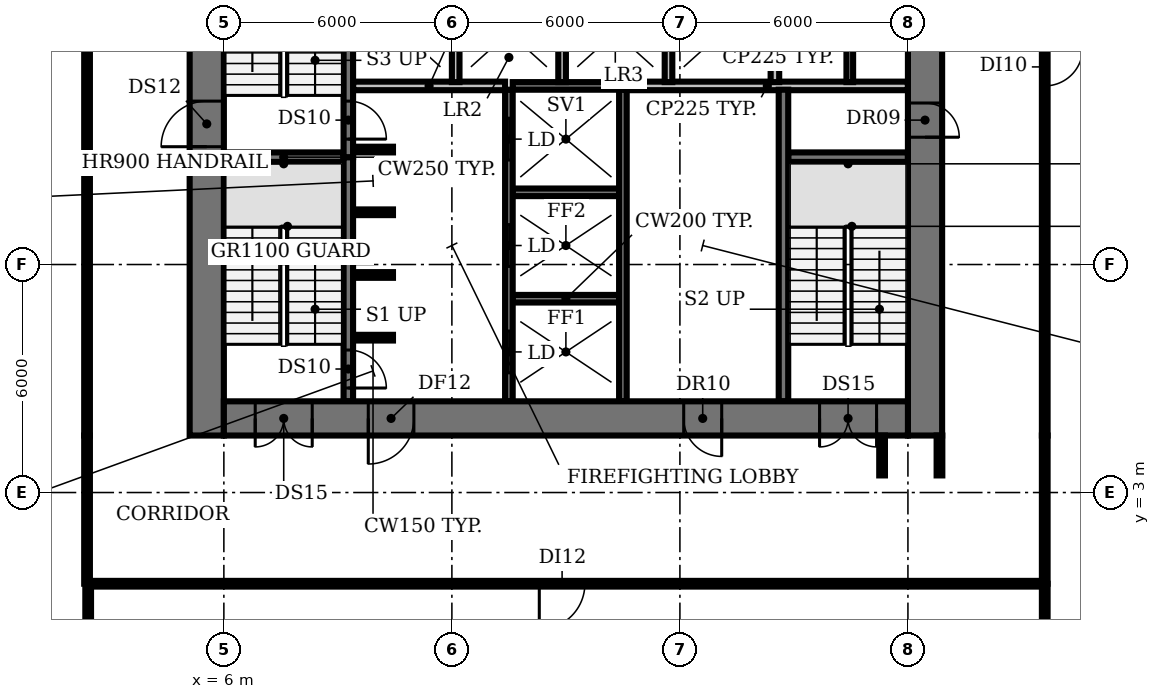
"""IFC4 building model, lengths in metres.
Left out: names, types, materials, properties, quantities, classifications, styles, units other than length and angle.
Written with IfcOpenShell. Run it as: python <this file> out.ifc"""

import sys

from ifc_helpers import new_model, si_unit, direction, frame, frame_2d, origin, place, context, subcontext, project, spatial, rectangle, extrude, element, fill, save


model = new_model("IFC4")
c1 = context("Model", 3, precision=1e-05, world=origin(), true_north=direction((0.0, 1.0)))
c2 = subcontext(c1, "Body", "Model", "MODEL_VIEW")
j1 = project(units=[si_unit("LENGTHUNIT", "METRE"), si_unit("PLANEANGLEUNIT", "RADIAN")], contexts=[c1])
p1 = place(None, origin())
s1 = spatial("IfcSite", under=j1, at=p1, CompositionType="ELEMENT")
p2 = place(p1, origin())
s2 = spatial("IfcBuilding", under=s1, at=p2, CompositionType="ELEMENT")
p3 = place(p2, frame((0.0, 0.0, 15.5)))
s3 = spatial("IfcBuildingStorey", under=s2, at=p3, CompositionType="ELEMENT", Elevation=15.5)
p4 = place(p3, frame((9.4, 7.075, 0.0), z_axis=(0.0, 0.0, 1.0), x_axis=(1.0, 0.0, 0.0)))
e1 = element("IfcWall", 1, at=p4, inside=s3, PredefinedType="SHEAR", context=c2, shape_type="SweptSolid", body=[
    extrude(rectangle(XDim=1.05, YDim=0.15, at=frame_2d((0.525, 0.0))), origin(), (0.0, 0.0, 1.0), 4.15),
])
p5 = place(p3, frame((13.6, 8.1, 0.0), z_axis=(0.0, 0.0, 1.0), x_axis=(1.0, 0.0, 0.0)))
e2 = element("IfcWall", 2, at=p5, inside=s3, PredefinedType="SHEAR", context=c2, shape_type="SweptSolid", body=[
    extrude(rectangle(XDim=2.8, YDim=0.2, at=frame_2d((1.4, 0.0))), origin(), (0.0, 0.0, 1.0), 4.15),
])
for number, where, z_axis, x_axis in (
    (3, (9.4, 8.725, 0.0), (0.0, 0.0, 1.0), (1.0, 0.0, 0.0)),
    (4, (9.4, 10.375, 0.0), (0.0, 0.0, 1.0), (1.0, 0.0, 0.0)),
):
    element("IfcWall", number, at=place(p3, frame(where, z_axis=z_axis, x_axis=x_axis)), inside=s3, PredefinedType="SHEAR", context=c2, shape_type="SweptSolid", body=[
        extrude(rectangle(XDim=1.05, YDim=0.15, at=frame_2d((0.525, 0.0))), origin(), (0.0, 0.0, 1.0), 4.15),
    ])
p6 = place(p3, frame((13.6, 10.9, 0.0), z_axis=(0.0, 0.0, 1.0), x_axis=(1.0, 0.0, 0.0)))
e5 = element("IfcWall", 5, at=p6, inside=s3, PredefinedType="SHEAR", context=c2, shape_type="SweptSolid", body=[
    extrude(rectangle(XDim=2.8, YDim=0.2, at=frame_2d((1.4, 0.0))), origin(), (0.0, 0.0, 1.0), 4.15),
])
for number, where, z_axis, x_axis in (
    (6, (6.0, 11.825, 0.0), (0.0, 0.0, 1.0), (1.0, 0.0, 0.0)),
    (7, (20.85, 11.825, 0.0), (0.0, 0.0, 1.0), (1.0, 0.0, 0.0)),
):
    element("IfcWall", number, at=place(p3, frame(where, z_axis=z_axis, x_axis=x_axis)), inside=s3, PredefinedType="SHEAR", context=c2, shape_type="SweptSolid", body=[
        extrude(rectangle(XDim=3.15, YDim=0.25, at=frame_2d((1.575, 0.0))), origin(), (0.0, 0.0, 1.0), 4.15),
    ])
p7 = place(p3, frame((9.4, 12.025, 0.0), z_axis=(0.0, 0.0, 1.0), x_axis=(1.0, 0.0, 0.0)))
e8 = element("IfcWall", 8, at=p7, inside=s3, PredefinedType="SHEAR", context=c2, shape_type="SweptSolid", body=[
    extrude(rectangle(XDim=1.05, YDim=0.15, at=frame_2d((0.525, 0.0))), origin(), (0.0, 0.0, 1.0), 4.15),
])
p8 = place(p3, frame((9.4, 13.7, 0.0), z_axis=(0.0, 0.0, 1.0), x_axis=(1.0, 0.0, 0.0)))
e9 = element("IfcWall", 9, at=p8, inside=s3, PredefinedType="PARTITIONING", context=c2, shape_type="SweptSolid", body=[
    extrude(rectangle(XDim=4.0, YDim=0.225, at=frame_2d((2.0, 0.0))), origin(), (0.0, 0.0, 1.0), 4.15),
])
p9 = place(p3, frame((13.6, 13.7, 0.0), z_axis=(0.0, 0.0, 1.0), x_axis=(1.0, 0.0, 0.0)))
e10 = element("IfcWall", 10, at=p9, inside=s3, PredefinedType="SHEAR", context=c2, shape_type="SweptSolid", body=[
    extrude(rectangle(XDim=2.8, YDim=0.2, at=frame_2d((1.4, 0.0))), origin(), (0.0, 0.0, 1.0), 4.15),
])
p10 = place(p3, frame((16.6, 13.7, 0.0), z_axis=(0.0, 0.0, 1.0), x_axis=(1.0, 0.0, 0.0)))
e11 = element("IfcWall", 11, at=p10, inside=s3, PredefinedType="PARTITIONING", context=c2, shape_type="SweptSolid", body=[
    extrude(rectangle(XDim=7.4, YDim=0.225, at=frame_2d((3.7, 0.0))), origin(), (0.0, 0.0, 1.0), 4.15),
])
p11 = place(p3, frame((9.275, 11.825, 0.0), z_axis=(0.0, 0.0, 1.0), x_axis=(0.0, -1.0, 0.0)))
e12 = element("IfcWall", 12, at=p11, inside=s3, PredefinedType="SHEAR", context=c2, shape_type="SweptSolid", body=[
    extrude(rectangle(XDim=6.425, YDim=0.25, at=frame_2d((3.212, 0.0))), origin(), (0.0, 0.0, 1.0), 4.15),
])
p12 = place(p11, frame((5.075, 0.0, 0.0)))
e13 = element("IfcOpeningElement", 13, at=p12, cuts=e12, PredefinedType="OPENING", context=c2, shape_type="SweptSolid", body=[
    extrude(rectangle(XDim=1.0, YDim=2.1, at=frame_2d((0.5, 1.05))), frame((0.0, 0.135, 0.0), z_axis=(0.0, -1.0, 0.0), x_axis=(1.0, 0.0, 0.0)), (0.0, 0.0, 1.0), 0.27),
])
p13 = place(p3, frame((9.275, 18.375, 0.0), z_axis=(0.0, 0.0, 1.0), x_axis=(0.0, -1.0, 0.0)))
e14 = element("IfcWall", 14, at=p13, inside=s3, PredefinedType="SHEAR", context=c2, shape_type="SweptSolid", body=[
    extrude(rectangle(XDim=6.55, YDim=0.25, at=frame_2d((3.275, 0.0))), origin(), (0.0, 0.0, 1.0), 4.15),
])
p14 = place(p13, frame((5.075, 0.0, 0.0)))
e15 = element("IfcOpeningElement", 15, at=p14, cuts=e14, PredefinedType="OPENING", context=c2, shape_type="SweptSolid", body=[
    extrude(rectangle(XDim=1.0, YDim=2.1, at=frame_2d((0.5, 1.05))), frame((0.0, 0.135, 0.0), z_axis=(0.0, -1.0, 0.0), x_axis=(1.0, 0.0, 0.0)), (0.0, 0.0, 1.0), 0.27),
])
p15 = place(p3, frame((12.1, 13.8, 0.0), z_axis=(0.0, 0.0, 1.0), x_axis=(0.0, 1.0, 0.0)))
e16 = element("IfcWall", 16, at=p15, inside=s3, PredefinedType="SOLIDWALL", context=c2, shape_type="SweptSolid", body=[
    extrude(rectangle(XDim=2.6, YDim=0.2, at=frame_2d((1.3, 0.0))), origin(), (0.0, 0.0, 1.0), 4.15),
])
p16 = place(p3, frame((13.5, 5.4, 0.0), z_axis=(0.0, 0.0, 1.0), x_axis=(0.0, 1.0, 0.0)))
e17 = element("IfcWall", 17, at=p16, inside=s3, PredefinedType="SHEAR", context=c2, shape_type="SweptSolid", body=[
    extrude(rectangle(XDim=8.2, YDim=0.2, at=frame_2d((4.1, 0.0))), origin(), (0.0, 0.0, 1.0), 4.15),
])
p17 = place(p16, frame((0.75, 0.0, 0.0)))
e18 = element("IfcOpeningElement", 18, at=p17, cuts=e17, PredefinedType="OPENING", context=c2, shape_type="SweptSolid", body=[
    extrude(rectangle(XDim=1.1, YDim=2.1, at=frame_2d((0.55, 1.05))), frame((0.0, 0.11, 0.0), z_axis=(0.0, -1.0, 0.0), x_axis=(1.0, 0.0, 0.0)), (0.0, 0.0, 1.0), 0.22),
])
p18 = place(p16, frame((3.55, 0.0, 0.0)))
e19 = element("IfcOpeningElement", 19, at=p18, cuts=e17, PredefinedType="OPENING", context=c2, shape_type="SweptSolid", body=[
    extrude(rectangle(XDim=1.1, YDim=2.1, at=frame_2d((0.55, 1.05))), frame((0.0, 0.11, 0.0), z_axis=(0.0, -1.0, 0.0), x_axis=(1.0, 0.0, 0.0)), (0.0, 0.0, 1.0), 0.22),
])
p19 = place(p16, frame((6.35, 0.0, 0.0)))
e20 = element("IfcOpeningElement", 20, at=p19, cuts=e17, PredefinedType="OPENING", context=c2, shape_type="SweptSolid", body=[
    extrude(rectangle(XDim=1.1, YDim=2.1, at=frame_2d((0.55, 1.05))), frame((0.0, 0.11, 0.0), z_axis=(0.0, -1.0, 0.0), x_axis=(1.0, 0.0, 0.0)), (0.0, 0.0, 1.0), 0.22),
])
p20 = place(p3, frame((14.9, 13.8, 0.0), z_axis=(0.0, 0.0, 1.0), x_axis=(0.0, 1.0, 0.0)))
e21 = element("IfcWall", 21, at=p20, inside=s3, PredefinedType="SOLIDWALL", context=c2, shape_type="SweptSolid", body=[
    extrude(rectangle(XDim=2.6, YDim=0.2, at=frame_2d((1.3, 0.0))), origin(), (0.0, 0.0, 1.0), 4.15),
])
p21 = place(p3, frame((16.5, 5.4, 0.0), z_axis=(0.0, 0.0, 1.0), x_axis=(0.0, 1.0, 0.0)))
e22 = element("IfcWall", 22, at=p21, inside=s3, PredefinedType="SHEAR", context=c2, shape_type="SweptSolid", body=[
    extrude(rectangle(XDim=8.2, YDim=0.2, at=frame_2d((4.1, 0.0))), origin(), (0.0, 0.0, 1.0), 4.15),
])
p22 = place(p3, frame((17.7, 13.8, 0.0), z_axis=(0.0, 0.0, 1.0), x_axis=(0.0, 1.0, 0.0)))
e23 = element("IfcWall", 23, at=p22, inside=s3, PredefinedType="SOLIDWALL", context=c2, shape_type="SweptSolid", body=[
    extrude(rectangle(XDim=2.6, YDim=0.2, at=frame_2d((1.3, 0.0))), origin(), (0.0, 0.0, 1.0), 4.15),
])
p23 = place(p3, frame((20.5, 13.8, 0.0), z_axis=(0.0, 0.0, 1.0), x_axis=(0.0, 1.0, 0.0)))
e24 = element("IfcWall", 24, at=p23, inside=s3, PredefinedType="PARTITIONING", context=c2, shape_type="SweptSolid", body=[
    extrude(rectangle(XDim=2.6, YDim=0.225, at=frame_2d((1.3, 0.0))), origin(), (0.0, 0.0, 1.0), 4.15),
])
p24 = place(p3, frame((20.725, 5.4, 0.0), z_axis=(0.0, 0.0, 1.0), x_axis=(0.0, 1.0, 0.0)))
e25 = element("IfcWall", 25, at=p24, inside=s3, PredefinedType="SHEAR", context=c2, shape_type="SweptSolid", body=[
    extrude(rectangle(XDim=8.2, YDim=0.25, at=frame_2d((4.1, 0.0))), origin(), (0.0, 0.0, 1.0), 4.15),
])
p25 = place(p3, frame((22.47, 13.8, 0.0), z_axis=(0.0, 0.0, 1.0), x_axis=(0.0, 1.0, 0.0)))
e26 = element("IfcWall", 26, at=p25, inside=s3, PredefinedType="PARTITIONING", context=c2, shape_type="SweptSolid", body=[
    extrude(rectangle(XDim=2.6, YDim=0.175, at=frame_2d((1.3, 0.0))), origin(), (0.0, 0.0, 1.0), 4.15),
])
p26 = place(p3, frame((5.55, 4.5, 0.0), z_axis=(0.0, 0.0, 1.0), x_axis=(0.0, 1.0, 0.0)))
e27 = element("IfcWall", 27, at=p26, inside=s3, PredefinedType="SHEAR", context=c2, shape_type="SweptSolid", body=[
    extrude(rectangle(XDim=21.2, YDim=0.9, at=frame_2d((10.6, 0.0))), origin(), (0.0, 0.0, 1.0), 4.15),
])
p27 = place(p26, frame((7.6, 0.0, 0.0)))
e28 = element("IfcOpeningElement", 28, at=p27, cuts=e27, PredefinedType="OPENING", context=c2, shape_type="SweptSolid", body=[
    extrude(rectangle(XDim=1.2, YDim=2.1, at=frame_2d((0.6, 1.05))), frame((0.0, 0.46, 0.0), z_axis=(0.0, -1.0, 0.0), x_axis=(1.0, 0.0, 0.0)), (0.0, 0.0, 1.0), 0.92),
])
p28 = place(p26, frame((14.15, 0.0, 0.0)))
e29 = element("IfcOpeningElement", 29, at=p28, cuts=e27, PredefinedType="OPENING", context=c2, shape_type="SweptSolid", body=[
    extrude(rectangle(XDim=1.2, YDim=2.1, at=frame_2d((0.6, 1.05))), frame((0.0, 0.46, 0.0), z_axis=(0.0, -1.0, 0.0), x_axis=(1.0, 0.0, 0.0)), (0.0, 0.0, 1.0), 0.92),
])
p29 = place(p3, frame((24.45, 25.7, 0.0), z_axis=(0.0, 0.0, 1.0), x_axis=(0.0, -1.0, 0.0)))
e30 = element("IfcWall", 30, at=p29, inside=s3, PredefinedType="SHEAR", context=c2, shape_type="SweptSolid", body=[
    extrude(rectangle(XDim=21.2, YDim=0.9, at=frame_2d((10.6, 0.0))), origin(), (0.0, 0.0, 1.0), 4.15),
])
p30 = place(p29, frame((12.45, 0.0, 0.0)))
e31 = element("IfcOpeningElement", 31, at=p30, cuts=e30, PredefinedType="OPENING", context=c2, shape_type="SweptSolid", body=[
    extrude(rectangle(XDim=0.9, YDim=2.1, at=frame_2d((0.45, 1.05))), frame((0.0, 0.46, 0.0), z_axis=(0.0, -1.0, 0.0), x_axis=(1.0, 0.0, 0.0)), (0.0, 0.0, 1.0), 0.92),
])
p31 = place(p29, frame((6.45, 0.0, 0.0)))
e32 = element("IfcOpeningElement", 32, at=p31, cuts=e30, PredefinedType="OPENING", context=c2, shape_type="SweptSolid", body=[
    extrude(rectangle(XDim=2.0, YDim=2.1, at=frame_2d((1.0, 1.05))), frame((0.0, 0.46, 0.0), z_axis=(0.0, -1.0, 0.0), x_axis=(1.0, 0.0, 0.0)), (0.0, 0.0, 1.0), 0.92),
])
p32 = place(p3, frame((24.0, 4.95, 0.0), z_axis=(0.0, 0.0, 1.0), x_axis=(-1.0, 0.0, 0.0)))
e33 = element("IfcWall", 33, at=p32, inside=s3, PredefinedType="SHEAR", context=c2, shape_type="SweptSolid", body=[
    extrude(rectangle(XDim=18.0, YDim=0.9, at=frame_2d((9.0, 0.0))), origin(), (0.0, 0.0, 1.0), 4.15),
])
p33 = place(p32, frame((15.675, 0.0, 0.0)))
e34 = element("IfcOpeningElement", 34, at=p33, cuts=e33, PredefinedType="OPENING", context=c2, shape_type="SweptSolid", body=[
    extrude(rectangle(XDim=1.5, YDim=2.1, at=frame_2d((0.75, 1.05))), frame((0.0, 0.46, 0.0), z_axis=(0.0, -1.0, 0.0), x_axis=(1.0, 0.0, 0.0)), (0.0, 0.0, 1.0), 0.92),
])
p34 = place(p32, frame((0.825, 0.0, 0.0)))
e35 = element("IfcOpeningElement", 35, at=p34, cuts=e33, PredefinedType="OPENING", context=c2, shape_type="SweptSolid", body=[
    extrude(rectangle(XDim=1.5, YDim=2.1, at=frame_2d((0.75, 1.05))), frame((0.0, 0.46, 0.0), z_axis=(0.0, -1.0, 0.0), x_axis=(1.0, 0.0, 0.0)), (0.0, 0.0, 1.0), 0.92),
])
p35 = place(p32, frame((13.0, 0.0, 0.0)))
e36 = element("IfcOpeningElement", 36, at=p35, cuts=e33, PredefinedType="OPENING", context=c2, shape_type="SweptSolid", body=[
    extrude(rectangle(XDim=1.2, YDim=2.1, at=frame_2d((0.6, 1.05))), frame((0.0, 0.46, 0.0), z_axis=(0.0, -1.0, 0.0), x_axis=(1.0, 0.0, 0.0)), (0.0, 0.0, 1.0), 0.92),
])
p36 = place(p32, frame((4.9, 0.0, 0.0)))
e37 = element("IfcOpeningElement", 37, at=p36, cuts=e33, PredefinedType="OPENING", context=c2, shape_type="SweptSolid", body=[
    extrude(rectangle(XDim=1.0, YDim=2.1, at=frame_2d((0.5, 1.05))), frame((0.0, 0.46, 0.0), z_axis=(0.0, -1.0, 0.0), x_axis=(1.0, 0.0, 0.0)), (0.0, 0.0, 1.0), 0.92),
])
p37 = place(p3, frame((2.4, 0.6, 0.0), z_axis=(0.0, 0.0, 1.0), x_axis=(0.0, 1.0, 0.0)))
e38 = element("IfcWall", 38, at=p37, inside=s3, PredefinedType="PARTITIONING", context=c2, shape_type="SweptSolid", body=[
    extrude(rectangle(XDim=3.9, YDim=0.15, at=frame_2d((1.95, 0.0))), origin(), (0.0, 0.0, 1.0), 3.08),
])
p38 = place(p3, frame((2.4, 4.5, 0.0), z_axis=(0.0, 0.0, 1.0), x_axis=(0.0, 1.0, 0.0)))
e39 = element("IfcWall", 39, at=p38, inside=s3, PredefinedType="PARTITIONING", context=c2, shape_type="SweptSolid", body=[
    extrude(rectangle(XDim=21.2, YDim=0.15, at=frame_2d((10.6, 0.0))), origin(), (0.0, 0.0, 1.0), 3.08),
])
p39 = place(p38, frame((10.8, 0.0, 0.0)))
e40 = element("IfcOpeningElement", 40, at=p39, cuts=e39, PredefinedType="OPENING", context=c2, shape_type="SweptSolid", body=[
    extrude(rectangle(XDim=1.2, YDim=2.1, at=frame_2d((0.6, 1.05))), frame((0.0, 0.085, 0.0), z_axis=(0.0, -1.0, 0.0), x_axis=(1.0, 0.0, 0.0)), (0.0, 0.0, 1.0), 0.17),
])
p40 = place(p3, frame((2.43, -1.77, 0.0), z_axis=(0.0, 0.0, 1.0), x_axis=(0.0, 1.0, 0.0)))
e41 = element("IfcWall", 41, at=p40, inside=s3, PredefinedType="PARTITIONING", context=c2, shape_type="SweptSolid", body=[
    extrude(rectangle(XDim=2.37, YDim=0.15, at=frame_2d((1.185, 0.0))), origin(), (0.0, 0.0, 1.0), 3.08),
])
for number, where, z_axis, x_axis in (
    (42, (23.32, 3.45, 0.0), (0.0, 0.0, 1.0), (0.0, 1.0, 0.0)),
    (43, (24.83, 3.45, 0.0), (0.0, 0.0, 1.0), (0.0, 1.0, 0.0)),
):
    element("IfcWall", number, at=place(p3, frame(where, z_axis=z_axis, x_axis=x_axis)), inside=s3, PredefinedType="PARTITIONING", context=c2, shape_type="SweptSolid", body=[
        extrude(rectangle(XDim=1.05, YDim=0.15, at=frame_2d((0.525, 0.0))), origin(), (0.0, 0.0, 1.0), 3.08),
    ])
p41 = place(p3, frame((27.6, -4.97, 0.0), z_axis=(0.0, 0.0, 1.0), x_axis=(0.0, 1.0, 0.0)))
e44 = element("IfcWall", 44, at=p41, inside=s3, PredefinedType="PARTITIONING", context=c2, shape_type="SweptSolid", body=[
    extrude(rectangle(XDim=5.57, YDim=0.15, at=frame_2d((2.785, 0.0))), origin(), (0.0, 0.0, 1.0), 3.08),
])
p42 = place(p3, frame((27.6, 0.6, 0.0), z_axis=(0.0, 0.0, 1.0), x_axis=(-1.0, 0.0, 0.0)))
e45 = element("IfcWall", 45, at=p42, inside=s3, PredefinedType="PARTITIONING", context=c2, shape_type="SweptSolid", body=[
    extrude(rectangle(XDim=25.2, YDim=0.15, at=frame_2d((12.6, 0.0))), origin(), (0.0, 0.0, 1.0), 3.08),
])
p43 = place(p42, frame((12.1, 0.0, 0.0)))
e46 = element("IfcOpeningElement", 46, at=p43, cuts=e45, PredefinedType="OPENING", context=c2, shape_type="SweptSolid", body=[
    extrude(rectangle(XDim=1.2, YDim=2.1, at=frame_2d((0.6, 1.05))), frame((0.0, 0.085, 0.0), z_axis=(0.0, -1.0, 0.0), x_axis=(1.0, 0.0, 0.0)), (0.0, 0.0, 1.0), 0.17),
])
p44 = place(p3, frame((27.6, 0.6, 0.0), z_axis=(0.0, 0.0, 1.0), x_axis=(0.0, 1.0, 0.0)))
e47 = element("IfcWall", 47, at=p44, inside=s3, PredefinedType="PARTITIONING", context=c2, shape_type="SweptSolid", body=[
    extrude(rectangle(XDim=3.9, YDim=0.15, at=frame_2d((1.95, 0.0))), origin(), (0.0, 0.0, 1.0), 3.08),
])
p45 = place(p3, frame((27.6, 23.77, 0.0), z_axis=(0.0, 0.0, 1.0), x_axis=(0.0, -1.0, 0.0)))
e48 = element("IfcWall", 48, at=p45, inside=s3, PredefinedType="PARTITIONING", context=c2, shape_type="SweptSolid", body=[
    extrude(rectangle(XDim=19.27, YDim=0.15, at=frame_2d((9.635, 0.0))), origin(), (0.0, 0.0, 1.0), 3.08),
])
p46 = place(p45, frame((9.07, 0.0, 0.0)))
e49 = element("IfcOpeningElement", 49, at=p46, cuts=e48, PredefinedType="OPENING", context=c2, shape_type="SweptSolid", body=[
    extrude(rectangle(XDim=1.0, YDim=2.1, at=frame_2d((0.5, 1.05))), frame((0.0, 0.085, 0.0), z_axis=(0.0, -1.0, 0.0), x_axis=(1.0, 0.0, 0.0)), (0.0, 0.0, 1.0), 0.17),
])
p47 = place(p12, origin())
e50 = element("IfcDoor", 50, at=p47, inside=s3, OperationType="SINGLE_SWING_RIGHT", PredefinedType="DOOR", context=c2, shape_type="SweptSolid", body=[
    extrude(rectangle(XDim=1.0, YDim=2.1, at=frame_2d((0.5, 1.05))), frame((0.0, 0.025, 0.0), z_axis=(0.0, -1.0, 0.0), x_axis=(1.0, 0.0, 0.0)), (0.0, 0.0, 1.0), 0.05),
])
fill(e13, e50)
p48 = place(p14, origin())
e51 = element("IfcDoor", 51, at=p48, inside=s3, OperationType="SINGLE_SWING_RIGHT", PredefinedType="DOOR", context=c2, shape_type="SweptSolid", body=[
    extrude(rectangle(XDim=1.0, YDim=2.1, at=frame_2d((0.5, 1.05))), frame((0.0, 0.025, 0.0), z_axis=(0.0, -1.0, 0.0), x_axis=(1.0, 0.0, 0.0)), (0.0, 0.0, 1.0), 0.05),
])
fill(e15, e51)
p49 = place(p17, origin())
e52 = element("IfcDoor", 52, at=p49, inside=s3, OperationType="DOUBLE_DOOR_SLIDING", PredefinedType="DOOR", context=c2, shape_type="SweptSolid", body=[
    extrude(rectangle(XDim=1.1, YDim=2.1, at=frame_2d((0.55, 1.05))), frame((0.0, 0.025, 0.0), z_axis=(0.0, -1.0, 0.0), x_axis=(1.0, 0.0, 0.0)), (0.0, 0.0, 1.0), 0.05),
])
fill(e18, e52)
p50 = place(p18, origin())
e53 = element("IfcDoor", 53, at=p50, inside=s3, OperationType="DOUBLE_DOOR_SLIDING", PredefinedType="DOOR", context=c2, shape_type="SweptSolid", body=[
    extrude(rectangle(XDim=1.1, YDim=2.1, at=frame_2d((0.55, 1.05))), frame((0.0, 0.025, 0.0), z_axis=(0.0, -1.0, 0.0), x_axis=(1.0, 0.0, 0.0)), (0.0, 0.0, 1.0), 0.05),
])
fill(e19, e53)
p51 = place(p19, origin())
e54 = element("IfcDoor", 54, at=p51, inside=s3, OperationType="DOUBLE_DOOR_SLIDING", PredefinedType="DOOR", context=c2, shape_type="SweptSolid", body=[
    extrude(rectangle(XDim=1.1, YDim=2.1, at=frame_2d((0.55, 1.05))), frame((0.0, 0.025, 0.0), z_axis=(0.0, -1.0, 0.0), x_axis=(1.0, 0.0, 0.0)), (0.0, 0.0, 1.0), 0.05),
])
fill(e20, e54)
p52 = place(p27, origin())
e55 = element("IfcDoor", 55, at=p52, inside=s3, OperationType="SINGLE_SWING_LEFT", PredefinedType="DOOR", context=c2, shape_type="SweptSolid", body=[
    extrude(rectangle(XDim=1.2, YDim=2.1, at=frame_2d((0.6, 1.05))), frame((0.0, 0.025, 0.0), z_axis=(0.0, -1.0, 0.0), x_axis=(1.0, 0.0, 0.0)), (0.0, 0.0, 1.0), 0.05),
])
fill(e28, e55)
p53 = place(p30, origin())
e56 = element("IfcDoor", 56, at=p53, inside=s3, OperationType="SINGLE_SWING_RIGHT", PredefinedType="DOOR", context=c2, shape_type="SweptSolid", body=[
    extrude(rectangle(XDim=0.9, YDim=2.1, at=frame_2d((0.45, 1.05))), frame((0.0, -0.39, 0.0), z_axis=(0.0, -1.0, 0.0), x_axis=(1.0, 0.0, 0.0)), (0.0, 0.0, 1.0), 0.05),
])
fill(e31, e56)
p54 = place(p33, origin())
e57 = element("IfcDoor", 57, at=p54, inside=s3, OperationType="DOUBLE_DOOR_SINGLE_SWING", PredefinedType="DOOR", context=c2, shape_type="SweptSolid", body=[
    extrude(rectangle(XDim=1.5, YDim=2.1, at=frame_2d((0.75, 1.05))), frame((0.0, 0.025, 0.0), z_axis=(0.0, -1.0, 0.0), x_axis=(1.0, 0.0, 0.0)), (0.0, 0.0, 1.0), 0.05),
])
fill(e34, e57)
p55 = place(p34, origin())
e58 = element("IfcDoor", 58, at=p55, inside=s3, OperationType="DOUBLE_DOOR_SINGLE_SWING", PredefinedType="DOOR", context=c2, shape_type="SweptSolid", body=[
    extrude(rectangle(XDim=1.5, YDim=2.1, at=frame_2d((0.75, 1.05))), frame((0.0, 0.025, 0.0), z_axis=(0.0, -1.0, 0.0), x_axis=(1.0, 0.0, 0.0)), (0.0, 0.0, 1.0), 0.05),
])
fill(e35, e58)
p56 = place(p35, origin())
e59 = element("IfcDoor", 59, at=p56, inside=s3, OperationType="SINGLE_SWING_RIGHT", PredefinedType="DOOR", context=c2, shape_type="SweptSolid", body=[
    extrude(rectangle(XDim=1.2, YDim=2.1, at=frame_2d((0.6, 1.05))), frame((0.0, 0.025, 0.0), z_axis=(0.0, -1.0, 0.0), x_axis=(1.0, 0.0, 0.0)), (0.0, 0.0, 1.0), 0.05),
])
fill(e36, e59)
p57 = place(p36, origin())
e60 = element("IfcDoor", 60, at=p57, inside=s3, OperationType="SINGLE_SWING_LEFT", PredefinedType="DOOR", context=c2, shape_type="SweptSolid", body=[
    extrude(rectangle(XDim=1.0, YDim=2.1, at=frame_2d((0.5, 1.05))), frame((0.0, -0.39, 0.0), z_axis=(0.0, -1.0, 0.0), x_axis=(1.0, 0.0, 0.0)), (0.0, 0.0, 1.0), 0.05),
])
fill(e37, e60)
p58 = place(p43, origin())
e61 = element("IfcDoor", 61, at=p58, inside=s3, OperationType="SINGLE_SWING_RIGHT", PredefinedType="DOOR", context=c2, shape_type="SweptSolid", body=[
    extrude(rectangle(XDim=1.2, YDim=2.1, at=frame_2d((0.6, 1.05))), frame((0.0, 0.025, 0.0), z_axis=(0.0, -1.0, 0.0), x_axis=(1.0, 0.0, 0.0)), (0.0, 0.0, 1.0), 0.05),
])
fill(e46, e61)
p59 = place(p46, origin())
e62 = element("IfcDoor", 62, at=p59, inside=s3, OperationType="SINGLE_SWING_LEFT", PredefinedType="DOOR", context=c2, shape_type="SweptSolid", body=[
    extrude(rectangle(XDim=1.0, YDim=2.1, at=frame_2d((0.5, 1.05))), frame((0.0, 0.025, 0.0), z_axis=(0.0, -1.0, 0.0), x_axis=(1.0, 0.0, 0.0)), (0.0, 0.0, 1.0), 0.05),
])
fill(e49, e62)
save(model, sys.argv[1])
